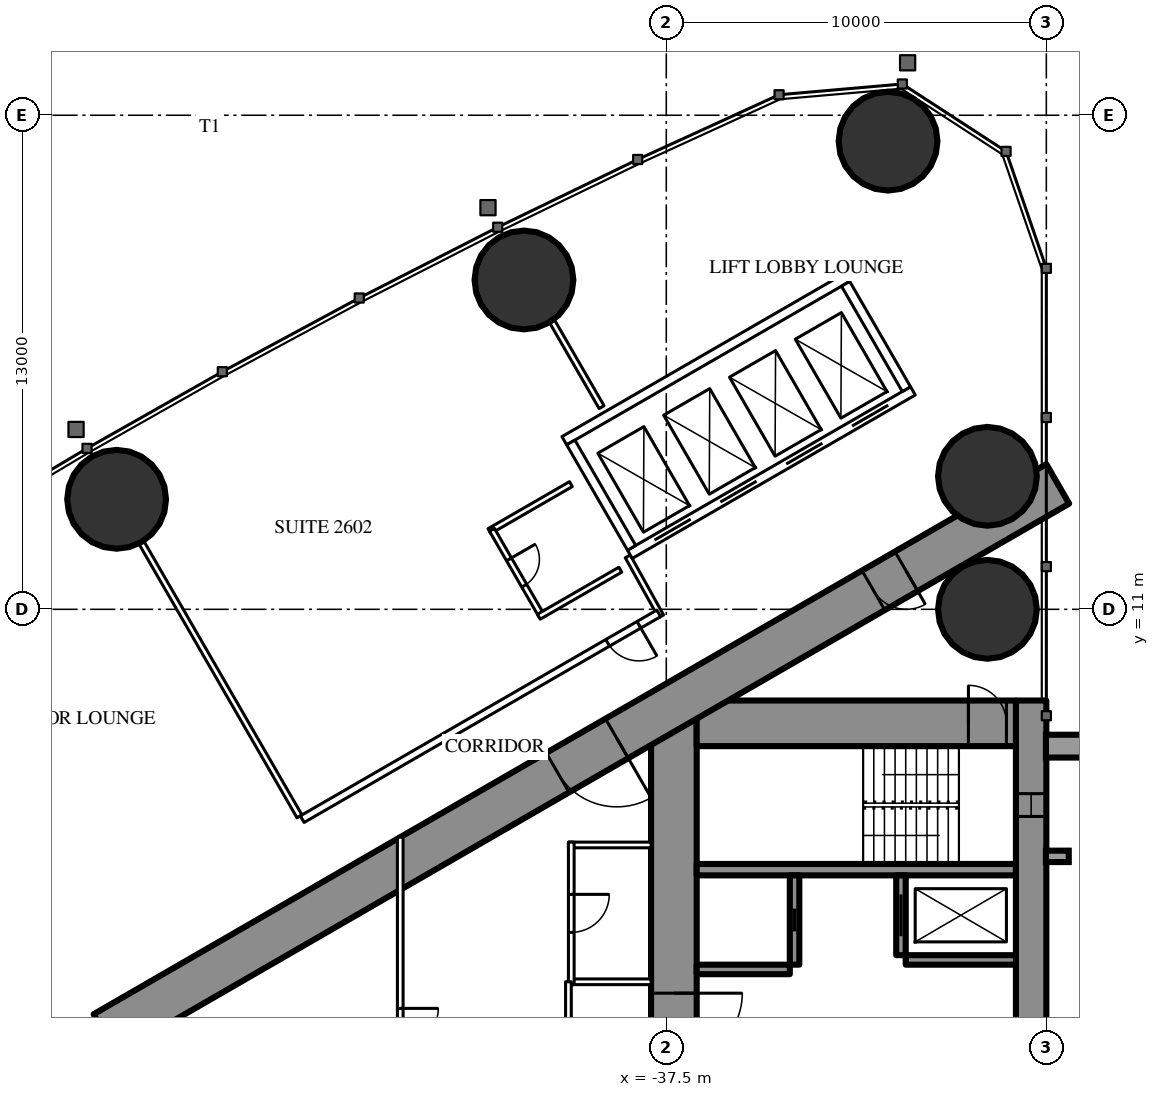
"""IFC4 building model, lengths in metres.
Left out: names, types, materials, properties, quantities, classifications, styles, units other than length and angle.
Written with IfcOpenShell. Run it as: python <this file> out.ifc"""

import sys

from ifc_helpers import new_model, si_unit, direction, frame, frame_2d, origin, origin_2d, place, context, subcontext, project, spatial, rectangle, hollow_circle, extrude, element, fill, save


model = new_model("IFC4")
c1 = context("Model", 3, precision=1e-05, world=origin(), true_north=direction((0.0, 1.0)))
c2 = subcontext(c1, "Body", "Model", "MODEL_VIEW")
j1 = project(units=[si_unit("LENGTHUNIT", "METRE"), si_unit("PLANEANGLEUNIT", "RADIAN")], contexts=[c1])
p1 = place(None, origin())
s1 = spatial("IfcSite", under=j1, at=p1, CompositionType="ELEMENT")
p2 = place(p1, origin())
s2 = spatial("IfcBuilding", under=s1, at=p2, CompositionType="ELEMENT")
p3 = place(p2, frame((0.0, 0.0, 101.1)))
s3 = spatial("IfcBuildingStorey", under=s2, at=p3, CompositionType="ELEMENT", Elevation=101.1)
for number, where, z_axis, x_axis in (
    (1, (-31.665, 23.318, 0.0), (0.0, 0.0, 1.0), (1.0, 0.0, 0.0)),
    (2, (-29.05, 11.0, 0.0), (0.0, 0.0, 1.0), (1.0, 0.0, 0.0)),
    (3, (-29.05, 14.5, 0.0), (0.0, 0.0, 1.0), (1.0, 0.0, 0.0)),
    (4, (-41.245, 19.666, 0.0), (0.0, 0.0, 1.0), (1.0, 0.0, 0.0)),
    (5, (-51.963, 13.895, 0.0), (0.0, 0.0, 1.0), (1.0, 0.0, 0.0)),
):
    element("IfcColumn", number, at=place(p3, frame(where, z_axis=z_axis, x_axis=x_axis)), inside=s3, PredefinedType="COLUMN", context=c2, shape_type="SweptSolid", body=[
        extrude(hollow_circle(Radius=1.3, WallThickness=0.1, at=origin_2d()), origin(), (0.0, 0.0, 1.0), 3.5),
    ])
p4 = place(p3, frame((-27.9, 8.6, 0.0), z_axis=(0.0, 0.0, 1.0), x_axis=(0.0, -1.0, 0.0)))
e6 = element("IfcWall", 6, at=p4, inside=s3, PredefinedType="SHEAR", context=c2, shape_type="SweptSolid", body=[
    extrude(rectangle(XDim=17.2, YDim=0.8, at=frame_2d((8.6, 0.0))), origin(), (0.0, 0.0, 1.0), 3.5),
])
p5 = place(p4, frame((2.45, 0.0, 0.6)))
e7 = element("IfcOpeningElement", 7, at=p5, cuts=e6, PredefinedType="OPENING", context=c2, shape_type="SweptSolid", body=[
    extrude(rectangle(XDim=0.6, YDim=2.1, at=frame_2d((0.3, 1.05))), frame((0.0, 0.41, 0.0), z_axis=(0.0, -1.0, 0.0), x_axis=(1.0, 0.0, 0.0)), (0.0, 0.0, 1.0), 0.82),
])
p6 = place(p4, frame((14.15, 0.0, 0.6)))
e8 = element("IfcOpeningElement", 8, at=p6, cuts=e6, PredefinedType="OPENING", context=c2, shape_type="SweptSolid", body=[
    extrude(rectangle(XDim=0.6, YDim=2.1, at=frame_2d((0.3, 1.05))), frame((0.0, 0.41, 0.0), z_axis=(0.0, -1.0, 0.0), x_axis=(1.0, 0.0, 0.0)), (0.0, 0.0, 1.0), 0.82),
])
p7 = place(p3, frame((-37.3, 8.6, 0.0), z_axis=(0.0, 0.0, 1.0), x_axis=(0.0, -1.0, 0.0)))
e9 = element("IfcWall", 9, at=p7, inside=s3, PredefinedType="SHEAR", context=c2, shape_type="SweptSolid", body=[
    extrude(rectangle(XDim=17.2, YDim=1.2, at=frame_2d((8.6, 0.0))), origin(), (0.0, 0.0, 1.0), 3.5),
])
p8 = place(p7, frame((7.7, 0.0, 0.0)))
e10 = element("IfcOpeningElement", 10, at=p8, cuts=e9, PredefinedType="OPENING", context=c2, shape_type="SweptSolid", body=[
    extrude(rectangle(XDim=1.8, YDim=2.2, at=frame_2d((0.9, 1.1))), frame((0.0, 0.61, 0.0), z_axis=(0.0, -1.0, 0.0), x_axis=(1.0, 0.0, 0.0)), (0.0, 0.0, 1.0), 1.22),
])
p9 = place(p3, frame((-28.3, 8.0, 0.0), z_axis=(0.0, 0.0, 1.0), x_axis=(-1.0, 0.0, 0.0)))
e11 = element("IfcWall", 11, at=p9, inside=s3, PredefinedType="SHEAR", context=c2, shape_type="SweptSolid", body=[
    extrude(rectangle(XDim=8.4, YDim=1.2, at=frame_2d((4.2, 0.0))), origin(), (0.0, 0.0, 1.0), 3.5),
])
p10 = place(p9, frame((0.25, 0.0, 0.0)))
e12 = element("IfcOpeningElement", 12, at=p10, cuts=e11, PredefinedType="OPENING", context=c2, shape_type="SweptSolid", body=[
    extrude(rectangle(XDim=1.0, YDim=2.2, at=frame_2d((0.5, 1.1))), frame((0.0, 0.61, 0.0), z_axis=(0.0, -1.0, 0.0), x_axis=(1.0, 0.0, 0.0)), (0.0, 0.0, 1.0), 1.22),
])
p11 = place(p3, frame((-28.3, 4.15, 0.0), z_axis=(0.0, 0.0, 1.0), x_axis=(-1.0, 0.0, 0.0)))
e13 = element("IfcWall", 13, at=p11, inside=s3, PredefinedType="SHEAR", context=c2, shape_type="SweptSolid", body=[
    extrude(rectangle(XDim=8.4, YDim=0.3, at=frame_2d((4.2, 0.0))), origin(), (0.0, 0.0, 1.0), 3.5),
])
p12 = place(p3, frame((-31.325, 4.0, 0.0), z_axis=(0.0, 0.0, 1.0), x_axis=(0.0, -1.0, 0.0)))
e14 = element("IfcWall", 14, at=p12, inside=s3, PredefinedType="SHEAR", context=c2, shape_type="SweptSolid", body=[
    extrude(rectangle(XDim=2.1, YDim=0.25, at=frame_2d((1.05, 0.0))), origin(), (0.0, 0.0, 1.0), 3.5),
])
p13 = place(p12, frame((0.5, 0.0, 0.0)))
e15 = element("IfcOpeningElement", 15, at=p13, cuts=e14, PredefinedType="OPENING", context=c2, shape_type="SweptSolid", body=[
    extrude(rectangle(XDim=1.1, YDim=2.2, at=frame_2d((0.55, 1.1))), frame((0.0, 0.135, 0.0), z_axis=(0.0, -1.0, 0.0), x_axis=(1.0, 0.0, 0.0)), (0.0, 0.0, 1.0), 0.27),
])
p14 = place(p3, frame((-34.125, 4.0, 0.0), z_axis=(0.0, 0.0, 1.0), x_axis=(0.0, -1.0, 0.0)))
e16 = element("IfcWall", 16, at=p14, inside=s3, PredefinedType="SHEAR", context=c2, shape_type="SweptSolid", body=[
    extrude(rectangle(XDim=2.35, YDim=0.25, at=frame_2d((1.175, 0.0))), origin(), (0.0, 0.0, 1.0), 3.5),
])
p15 = place(p14, frame((0.875, 0.0, 0.0)))
e17 = element("IfcOpeningElement", 17, at=p15, cuts=e16, PredefinedType="OPENING", context=c2, shape_type="SweptSolid", body=[
    extrude(rectangle(XDim=0.6, YDim=2.0, at=frame_2d((0.3, 1.0))), frame((0.0, 0.135, 0.0), z_axis=(0.0, -1.0, 0.0), x_axis=(1.0, 0.0, 0.0)), (0.0, 0.0, 1.0), 0.27),
])
p16 = place(p3, frame((-28.3, 1.775, 0.0), z_axis=(0.0, 0.0, 1.0), x_axis=(-1.0, 0.0, 0.0)))
e18 = element("IfcWall", 18, at=p16, inside=s3, PredefinedType="SHEAR", context=c2, shape_type="SweptSolid", body=[
    extrude(rectangle(XDim=2.9, YDim=0.25, at=frame_2d((1.45, 0.0))), origin(), (0.0, 0.0, 1.0), 3.5),
])
p17 = place(p3, frame((-34.25, 1.525, 0.0), z_axis=(0.0, 0.0, 1.0), x_axis=(-1.0, 0.0, 0.0)))
e19 = element("IfcWall", 19, at=p17, inside=s3, PredefinedType="SHEAR", context=c2, shape_type="SweptSolid", body=[
    extrude(rectangle(XDim=2.45, YDim=0.25, at=frame_2d((1.225, 0.0))), origin(), (0.0, 0.0, 1.0), 3.5),
])
p18 = place(p3, frame((-27.2, 14.3, 0.0), z_axis=(0.0, 0.0, 1.0), x_axis=(-0.866026593062, -0.499997940104, 0.0)))
e20 = element("IfcWall", 20, at=p18, inside=s3, PredefinedType="SHEAR", context=c2, shape_type="SweptSolid", body=[
    extrude(rectangle(XDim=28.946, YDim=1.2, at=frame_2d((14.473, 0.0))), origin(), (0.0, 0.0, 1.0), 3.5),
])
p19 = place(p18, frame((4.6, 0.0, 0.0)))
e21 = element("IfcOpeningElement", 21, at=p19, cuts=e20, PredefinedType="OPENING", context=c2, shape_type="SweptSolid", body=[
    extrude(rectangle(XDim=1.0, YDim=2.2, at=frame_2d((0.5, 1.1))), frame((0.0, 0.61, 0.0), z_axis=(0.0, -1.0, 0.0), x_axis=(1.0, 0.0, 0.0)), (0.0, 0.0, 1.0), 1.22),
])
p20 = place(p18, frame((13.395, 0.0, 0.0)))
e22 = element("IfcOpeningElement", 22, at=p20, cuts=e20, PredefinedType="OPENING", context=c2, shape_type="SweptSolid", body=[
    extrude(rectangle(XDim=1.8, YDim=2.2, at=frame_2d((0.9, 1.1))), frame((0.0, 0.61, 0.0), z_axis=(0.0, -1.0, 0.0), x_axis=(1.0, 0.0, 0.0)), (0.0, 0.0, 1.0), 1.22),
])
p21 = place(p3, frame((-47.151, 5.552, 0.0), z_axis=(0.0, 0.0, 1.0), x_axis=(-0.500003012045, 0.866023664773, 0.0)))
e23 = element("IfcWall", 23, at=p21, inside=s3, PredefinedType="PARTITIONING", context=c2, shape_type="SweptSolid", body=[
    extrude(rectangle(XDim=8.311, YDim=0.15, at=frame_2d((4.156, 0.0))), origin(), (0.0, 0.0, 1.0), 2.2),
])
p22 = place(p3, frame((-39.202, 16.32, 0.0), z_axis=(0.0, 0.0, 1.0), x_axis=(-0.499947391036, 0.866055775454, 0.0)))
e24 = element("IfcWall", 24, at=p22, inside=s3, PredefinedType="PARTITIONING", context=c2, shape_type="SweptSolid", body=[
    extrude(rectangle(XDim=2.599, YDim=0.15, at=frame_2d((1.3, 0.0))), origin(), (0.0, 0.0, 1.0), 3.25),
])
p23 = place(p3, frame((-38.513, 12.392, 0.0), z_axis=(0.0, 0.0, 1.0), x_axis=(0.485585508183, -0.874189175317, 0.0)))
e25 = element("IfcWall", 25, at=p23, inside=s3, PredefinedType="PARTITIONING", context=c2, shape_type="SweptSolid", body=[
    extrude(rectangle(XDim=1.805, YDim=0.15, at=frame_2d((0.902, 0.0))), origin(), (0.0, 0.0, 1.0), 3.25),
])
p24 = place(p3, frame((-37.7, 10.894, 0.0), z_axis=(0.0, 0.0, 1.0), x_axis=(-0.866027551079, -0.499996280759, 0.0)))
e26 = element("IfcWall", 26, at=p24, inside=s3, PredefinedType="PARTITIONING", context=c2, shape_type="SweptSolid", body=[
    extrude(rectangle(XDim=10.831, YDim=0.2, at=frame_2d((5.415, 0.0))), origin(), (0.0, 0.0, 1.0), 3.25),
])
p25 = place(p24, frame((0.6, 0.0, 0.0)))
e27 = element("IfcOpeningElement", 27, at=p25, cuts=e26, PredefinedType="OPENING", context=c2, shape_type="SweptSolid", body=[
    extrude(rectangle(XDim=0.95, YDim=2.2, at=frame_2d((0.475, 1.1))), frame((0.0, 0.11, 0.0), z_axis=(0.0, -1.0, 0.0), x_axis=(1.0, 0.0, 0.0)), (0.0, 0.0, 1.0), 0.22),
])
p26 = place(p3, frame((-40.01, 14.294, 0.0), z_axis=(0.0, 0.0, 1.0), x_axis=(-0.866031185235, -0.4999899861, 0.0)))
e28 = element("IfcWall", 28, at=p26, inside=s3, PredefinedType="PARTITIONING", context=c2, shape_type="SweptSolid", body=[
    extrude(rectangle(XDim=2.475, YDim=0.15, at=frame_2d((1.238, 0.0))), origin(), (0.0, 0.0, 1.0), 3.25),
])
p27 = place(p3, frame((-40.788, 10.843, 0.0), z_axis=(0.0, 0.0, 1.0), x_axis=(-0.500006934395, 0.866021400173, 0.0)))
e29 = element("IfcWall", 29, at=p27, inside=s3, PredefinedType="PARTITIONING", context=c2, shape_type="SweptSolid", body=[
    extrude(rectangle(XDim=2.6, YDim=0.15, at=frame_2d((1.3, 0.0))), origin(), (0.0, 0.0, 1.0), 3.25),
])
p28 = place(p27, frame((0.9, 0.0, 0.0)))
e30 = element("IfcOpeningElement", 30, at=p28, cuts=e29, PredefinedType="OPENING", context=c2, shape_type="SweptSolid", body=[
    extrude(rectangle(XDim=0.8, YDim=2.2, at=frame_2d((0.4, 1.1))), frame((0.0, 0.085, 0.0), z_axis=(0.0, -1.0, 0.0), x_axis=(1.0, 0.0, 0.0)), (0.0, 0.0, 1.0), 0.17),
])
p29 = place(p3, frame((-38.71, 12.042, 0.0), z_axis=(0.0, 0.0, 1.0), x_axis=(-0.86604923931, -0.499958713387, 0.0)))
e31 = element("IfcWall", 31, at=p29, inside=s3, PredefinedType="PARTITIONING", context=c2, shape_type="SweptSolid", body=[
    extrude(rectangle(XDim=2.475, YDim=0.15, at=frame_2d((1.237, 0.0))), origin(), (0.0, 0.0, 1.0), 3.25),
])
for number, where, z_axis, x_axis in (
    (32, (-37.9, 1.2, 0.0), (0.0, 0.0, 1.0), (-1.0, 0.0, 0.0)),
    (33, (-37.9, 4.8, 0.0), (0.0, 0.0, 1.0), (-1.0, 0.0, 0.0)),
):
    element("IfcWall", number, at=place(p3, frame(where, z_axis=z_axis, x_axis=x_axis)), inside=s3, PredefinedType="PARTITIONING", context=c2, shape_type="SweptSolid", body=[
        extrude(rectangle(XDim=2.175, YDim=0.15, at=frame_2d((1.087, 0.0))), origin(), (0.0, 0.0, 1.0), 3.25),
    ])
p30 = place(p3, frame((-40.0, 4.875, 0.0), z_axis=(0.0, 0.0, 1.0), x_axis=(0.0, -1.0, 0.0)))
e34 = element("IfcWall", 34, at=p30, inside=s3, PredefinedType="PARTITIONING", context=c2, shape_type="SweptSolid", body=[
    extrude(rectangle(XDim=3.75, YDim=0.15, at=frame_2d((1.875, 0.0))), origin(), (0.0, 0.0, 1.0), 3.25),
])
p31 = place(p30, frame((1.375, 0.0, 0.0)))
e35 = element("IfcOpeningElement", 35, at=p31, cuts=e34, PredefinedType="OPENING", context=c2, shape_type="SweptSolid", body=[
    extrude(rectangle(XDim=1.0, YDim=2.2, at=frame_2d((0.5, 1.1))), frame((0.0, 0.085, 0.0), z_axis=(0.0, -1.0, 0.0), x_axis=(1.0, 0.0, 0.0)), (0.0, 0.0, 1.0), 0.17),
])
p32 = place(p3, frame((-40.075, 1.2, 0.0), z_axis=(0.0, 0.0, 1.0), x_axis=(0.0, -1.0, 0.0)))
e36 = element("IfcWall", 36, at=p32, inside=s3, PredefinedType="PARTITIONING", context=c2, shape_type="SweptSolid", body=[
    extrude(rectangle(XDim=7.374, YDim=0.15, at=frame_2d((3.687, 0.0))), origin(), (0.0, 0.0, 1.0), 3.25),
])
p33 = place(p32, frame((2.787, 0.0, 0.0)))
e37 = element("IfcOpeningElement", 37, at=p33, cuts=e36, PredefinedType="OPENING", context=c2, shape_type="SweptSolid", body=[
    extrude(rectangle(XDim=1.8, YDim=2.2, at=frame_2d((0.9, 1.1))), frame((0.0, 0.085, 0.0), z_axis=(0.0, -1.0, 0.0), x_axis=(1.0, 0.0, 0.0)), (0.0, 0.0, 1.0), 0.17),
])
p34 = place(p3, frame((-44.5, 5.005, 0.0), z_axis=(0.0, 0.0, 1.0), x_axis=(0.0, -1.0, 0.0)))
e38 = element("IfcWall", 38, at=p34, inside=s3, PredefinedType="PARTITIONING", context=c2, shape_type="SweptSolid", body=[
    extrude(rectangle(XDim=10.009, YDim=0.15, at=frame_2d((5.005, 0.0))), origin(), (0.0, 0.0, 1.0), 2.45),
])
p35 = place(p34, frame((4.505, 0.0, 0.0)))
e39 = element("IfcOpeningElement", 39, at=p35, cuts=e38, PredefinedType="OPENING", context=c2, shape_type="SweptSolid", body=[
    extrude(rectangle(XDim=1.0, YDim=2.2, at=frame_2d((0.5, 1.1))), frame((0.0, 0.085, 0.0), z_axis=(0.0, -1.0, 0.0), x_axis=(1.0, 0.0, 0.0)), (0.0, 0.0, 1.0), 0.17),
])
p36 = place(p3, frame((-31.01, 16.747, 0.0), z_axis=(0.0, 0.0, 1.0), x_axis=(-0.866028165386, -0.499995216735, 0.0)))
e40 = element("IfcWall", 40, at=p36, inside=s3, PredefinedType="PARTITIONING", context=c2, shape_type="SweptSolid", body=[
    extrude(rectangle(XDim=8.6, YDim=0.25, at=frame_2d((4.3, 0.0))), origin(), (0.0, 0.0, 1.0), 3.25),
])
p37 = place(p36, frame((0.75, 0.0, 0.0)))
e41 = element("IfcOpeningElement", 41, at=p37, cuts=e40, PredefinedType="OPENING", context=c2, shape_type="SweptSolid", body=[
    extrude(rectangle(XDim=1.1, YDim=2.2, at=frame_2d((0.55, 1.1))), frame((0.0, 0.135, 0.0), z_axis=(0.0, -1.0, 0.0), x_axis=(1.0, 0.0, 0.0)), (0.0, 0.0, 1.0), 0.27),
])
p38 = place(p36, frame((2.75, 0.0, 0.0)))
e42 = element("IfcOpeningElement", 42, at=p38, cuts=e40, PredefinedType="OPENING", context=c2, shape_type="SweptSolid", body=[
    extrude(rectangle(XDim=1.1, YDim=2.2, at=frame_2d((0.55, 1.1))), frame((0.0, 0.135, 0.0), z_axis=(0.0, -1.0, 0.0), x_axis=(1.0, 0.0, 0.0)), (0.0, 0.0, 1.0), 0.27),
])
p39 = place(p36, frame((4.75, 0.0, 0.0)))
e43 = element("IfcOpeningElement", 43, at=p39, cuts=e40, PredefinedType="OPENING", context=c2, shape_type="SweptSolid", body=[
    extrude(rectangle(XDim=1.1, YDim=2.2, at=frame_2d((0.55, 1.1))), frame((0.0, 0.135, 0.0), z_axis=(0.0, -1.0, 0.0), x_axis=(1.0, 0.0, 0.0)), (0.0, 0.0, 1.0), 0.27),
])
p40 = place(p36, frame((6.75, 0.0, 0.0)))
e44 = element("IfcOpeningElement", 44, at=p40, cuts=e40, PredefinedType="OPENING", context=c2, shape_type="SweptSolid", body=[
    extrude(rectangle(XDim=1.1, YDim=2.2, at=frame_2d((0.55, 1.1))), frame((0.0, 0.135, 0.0), z_axis=(0.0, -1.0, 0.0), x_axis=(1.0, 0.0, 0.0)), (0.0, 0.0, 1.0), 0.27),
])
p41 = place(p3, frame((-32.736, 19.736, 0.0), z_axis=(0.0, 0.0, 1.0), x_axis=(-0.866028165386, -0.499995216735, 0.0)))
e45 = element("IfcWall", 45, at=p41, inside=s3, PredefinedType="PARTITIONING", context=c2, shape_type="SweptSolid", body=[
    extrude(rectangle(XDim=8.6, YDim=0.25, at=frame_2d((4.3, 0.0))), origin(), (0.0, 0.0, 1.0), 3.25),
])
p42 = place(p3, frame((-31.181, 16.793, 0.0), z_axis=(0.0, 0.0, 1.0), x_axis=(-0.499929347863, 0.866066190972, 0.0)))
e46 = element("IfcWall", 46, at=p42, inside=s3, PredefinedType="PARTITIONING", context=c2, shape_type="SweptSolid", body=[
    extrude(rectangle(XDim=3.201, YDim=0.25, at=frame_2d((1.6, 0.0))), origin(), (0.0, 0.0, 1.0), 3.25),
])
p43 = place(p3, frame((-38.413, 12.618, 0.0), z_axis=(0.0, 0.0, 1.0), x_axis=(-0.499872130319, 0.866099216793, 0.0)))
e47 = element("IfcWall", 47, at=p43, inside=s3, PredefinedType="PARTITIONING", context=c2, shape_type="SweptSolid", body=[
    extrude(rectangle(XDim=3.2, YDim=0.25, at=frame_2d((1.6, 0.0))), origin(), (0.0, 0.0, 1.0), 3.25),
])
p44 = place(p28, origin())
e48 = element("IfcDoor", 48, at=p44, inside=s3, OperationType="SINGLE_SWING_RIGHT", PredefinedType="DOOR", context=c2, shape_type="SweptSolid", body=[
    extrude(rectangle(XDim=0.8, YDim=2.2, at=frame_2d((0.4, 1.1))), frame((0.0, 0.025, 0.0), z_axis=(0.0, -1.0, 0.0), x_axis=(1.0, 0.0, 0.0)), (0.0, 0.0, 1.0), 0.05),
])
fill(e30, e48)
p45 = place(p25, origin())
e49 = element("IfcDoor", 49, at=p45, inside=s3, OperationType="SINGLE_SWING_LEFT", PredefinedType="DOOR", context=c2, shape_type="SweptSolid", body=[
    extrude(rectangle(XDim=0.95, YDim=2.2, at=frame_2d((0.475, 1.1))), frame((0.0, 0.025, 0.0), z_axis=(0.0, -1.0, 0.0), x_axis=(1.0, 0.0, 0.0)), (0.0, 0.0, 1.0), 0.05),
])
fill(e27, e49)
p46 = place(p31, origin())
e50 = element("IfcDoor", 50, at=p46, inside=s3, OperationType="SINGLE_SWING_LEFT", PredefinedType="DOOR", context=c2, shape_type="SweptSolid", body=[
    extrude(rectangle(XDim=1.0, YDim=2.2, at=frame_2d((0.5, 1.1))), frame((0.0, 0.025, 0.0), z_axis=(0.0, -1.0, 0.0), x_axis=(1.0, 0.0, 0.0)), (0.0, 0.0, 1.0), 0.05),
])
fill(e35, e50)
p47 = place(p35, origin())
e51 = element("IfcDoor", 51, at=p47, inside=s3, OperationType="SINGLE_SWING_LEFT", PredefinedType="DOOR", context=c2, shape_type="SweptSolid", body=[
    extrude(rectangle(XDim=1.0, YDim=2.2, at=frame_2d((0.5, 1.1))), frame((0.0, 0.025, 0.0), z_axis=(0.0, -1.0, 0.0), x_axis=(1.0, 0.0, 0.0)), (0.0, 0.0, 1.0), 0.05),
])
fill(e39, e51)
p48 = place(p19, origin())
e52 = element("IfcDoor", 52, at=p48, inside=s3, OperationType="SINGLE_SWING_LEFT", PredefinedType="DOOR", context=c2, shape_type="SweptSolid", body=[
    extrude(rectangle(XDim=1.0, YDim=2.2, at=frame_2d((0.5, 1.1))), frame((0.0, 0.025, 0.0), z_axis=(0.0, -1.0, 0.0), x_axis=(1.0, 0.0, 0.0)), (0.0, 0.0, 1.0), 0.05),
])
fill(e21, e52)
p49 = place(p20, origin())
e53 = element("IfcDoor", 53, at=p49, inside=s3, OperationType="DOUBLE_DOOR_SINGLE_SWING", PredefinedType="DOOR", context=c2, shape_type="SweptSolid", body=[
    extrude(rectangle(XDim=1.8, YDim=2.2, at=frame_2d((0.9, 1.1))), frame((0.0, 0.025, 0.0), z_axis=(0.0, -1.0, 0.0), x_axis=(1.0, 0.0, 0.0)), (0.0, 0.0, 1.0), 0.05),
])
fill(e22, e53)
p50 = place(p8, origin())
e54 = element("IfcDoor", 54, at=p50, inside=s3, OperationType="DOUBLE_DOOR_SINGLE_SWING", PredefinedType="DOOR", context=c2, shape_type="SweptSolid", body=[
    extrude(rectangle(XDim=1.8, YDim=2.2, at=frame_2d((0.9, 1.1))), frame((0.0, 0.025, 0.0), z_axis=(0.0, -1.0, 0.0), x_axis=(1.0, 0.0, 0.0)), (0.0, 0.0, 1.0), 0.05),
])
fill(e10, e54)
p51 = place(p10, origin())
e55 = element("IfcDoor", 55, at=p51, inside=s3, OperationType="SINGLE_SWING_RIGHT", PredefinedType="DOOR", context=c2, shape_type="SweptSolid", body=[
    extrude(rectangle(XDim=1.0, YDim=2.2, at=frame_2d((0.5, 1.1))), frame((0.0, 0.025, 0.0), z_axis=(0.0, -1.0, 0.0), x_axis=(1.0, 0.0, 0.0)), (0.0, 0.0, 1.0), 0.05),
])
fill(e12, e55)
p52 = place(p13, origin())
e56 = element("IfcDoor", 56, at=p52, inside=s3, OperationType="SLIDING_TO_LEFT", PredefinedType="USERDEFINED", context=c2, shape_type="SweptSolid", body=[
    extrude(rectangle(XDim=1.1, YDim=2.2, at=frame_2d((0.55, 1.1))), frame((0.0, 0.025, 0.0), z_axis=(0.0, -1.0, 0.0), x_axis=(1.0, 0.0, 0.0)), (0.0, 0.0, 1.0), 0.05),
])
fill(e15, e56)
p53 = place(p15, origin())
e57 = element("IfcDoor", 57, at=p53, inside=s3, OperationType="SLIDING_TO_LEFT", PredefinedType="DOOR", context=c2, shape_type="SweptSolid", body=[
    extrude(rectangle(XDim=0.6, YDim=2.0, at=frame_2d((0.3, 1.0))), frame((0.0, 0.025, 0.0), z_axis=(0.0, -1.0, 0.0), x_axis=(1.0, 0.0, 0.0)), (0.0, 0.0, 1.0), 0.05),
])
fill(e17, e57)
p54 = place(p37, origin())
e58 = element("IfcDoor", 58, at=p54, inside=s3, OperationType="DOUBLE_DOOR_SLIDING", PredefinedType="USERDEFINED", context=c2, shape_type="SweptSolid", body=[
    extrude(rectangle(XDim=1.1, YDim=2.2, at=frame_2d((0.55, 1.1))), frame((0.0, 0.025, 0.0), z_axis=(0.0, -1.0, 0.0), x_axis=(1.0, 0.0, 0.0)), (0.0, 0.0, 1.0), 0.05),
])
fill(e41, e58)
p55 = place(p38, origin())
e59 = element("IfcDoor", 59, at=p55, inside=s3, OperationType="DOUBLE_DOOR_SLIDING", PredefinedType="USERDEFINED", context=c2, shape_type="SweptSolid", body=[
    extrude(rectangle(XDim=1.1, YDim=2.2, at=frame_2d((0.55, 1.1))), frame((0.0, 0.025, 0.0), z_axis=(0.0, -1.0, 0.0), x_axis=(1.0, 0.0, 0.0)), (0.0, 0.0, 1.0), 0.05),
])
fill(e42, e59)
p56 = place(p39, origin())
e60 = element("IfcDoor", 60, at=p56, inside=s3, OperationType="DOUBLE_DOOR_SLIDING", PredefinedType="USERDEFINED", context=c2, shape_type="SweptSolid", body=[
    extrude(rectangle(XDim=1.1, YDim=2.2, at=frame_2d((0.55, 1.1))), frame((0.0, 0.025, 0.0), z_axis=(0.0, -1.0, 0.0), x_axis=(1.0, 0.0, 0.0)), (0.0, 0.0, 1.0), 0.05),
])
fill(e43, e60)
p57 = place(p40, origin())
e61 = element("IfcDoor", 61, at=p57, inside=s3, OperationType="DOUBLE_DOOR_SLIDING", PredefinedType="USERDEFINED", context=c2, shape_type="SweptSolid", body=[
    extrude(rectangle(XDim=1.1, YDim=2.2, at=frame_2d((0.55, 1.1))), frame((0.0, 0.025, 0.0), z_axis=(0.0, -1.0, 0.0), x_axis=(1.0, 0.0, 0.0)), (0.0, 0.0, 1.0), 0.05),
])
fill(e44, e61)
p58 = place(p5, origin())
e62 = element("IfcWindow", 62, at=p58, inside=s3, PartitioningType="SINGLE_PANEL", PredefinedType="WINDOW", context=c2, shape_type="SweptSolid", body=[
    extrude(rectangle(XDim=0.6, YDim=2.1, at=frame_2d((0.3, 1.05))), frame((0.0, 0.03, 0.0), z_axis=(0.0, -1.0, 0.0), x_axis=(1.0, 0.0, 0.0)), (0.0, 0.0, 1.0), 0.06),
])
fill(e7, e62)
save(model, sys.argv[1])
